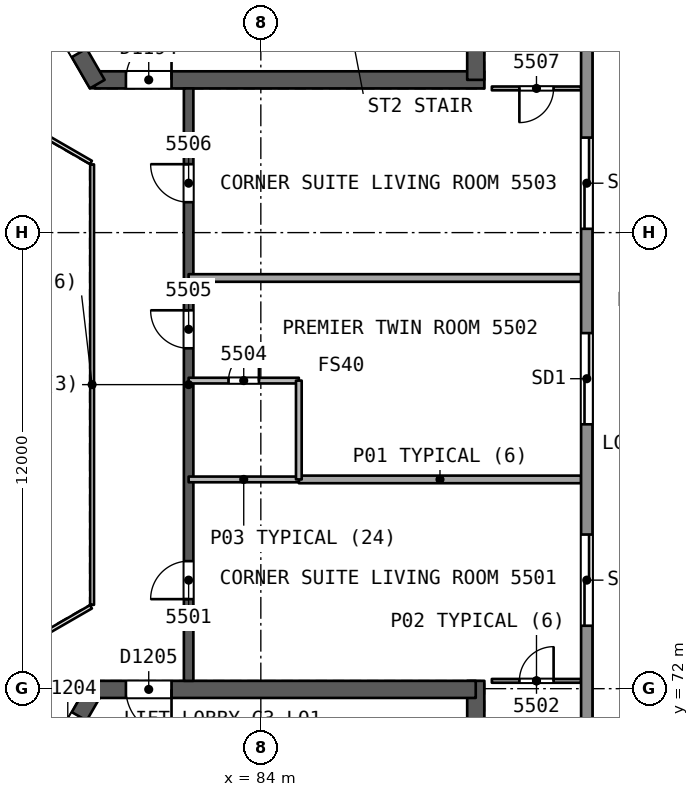
"""IFC4 building model, lengths in metres.
Left out: names, types, materials, properties, quantities, classifications, styles, units other than length and angle.
Written with IfcOpenShell. Run it as: python <this file> out.ifc"""

import sys

from ifc_helpers import new_model, si_unit, direction, frame, frame_2d, origin, place, context, subcontext, project, spatial, rectangle, extrude, element, fill, save


model = new_model("IFC4")
c1 = context("Model", 3, precision=1e-05, world=origin(), true_north=direction((0.0, 1.0)))
c2 = subcontext(c1, "Body", "Model", "MODEL_VIEW")
j1 = project(units=[si_unit("LENGTHUNIT", "METRE"), si_unit("PLANEANGLEUNIT", "RADIAN")], contexts=[c1])
p1 = place(None, origin())
s1 = spatial("IfcSite", under=j1, at=p1, CompositionType="ELEMENT")
p2 = place(p1, origin())
s2 = spatial("IfcBuilding", under=s1, at=p2, CompositionType="ELEMENT")
p3 = place(p2, frame((0.0, 0.0, 224.3)))
s3 = spatial("IfcBuildingStorey", under=s2, at=p3, CompositionType="ELEMENT", Elevation=224.3)
p4 = place(p3, frame((79.63, 88.019, 0.0), z_axis=(0.0, 0.0, 1.0), x_axis=(1.0, 0.0, 0.0)))
e1 = element("IfcWall", 1, at=p4, inside=s3, PredefinedType="SHEAR", context=c2, shape_type="SweptSolid", body=[
    extrude(rectangle(XDim=10.25, YDim=0.45, at=frame_2d((5.125, 0.0))), origin(), (0.0, 0.0, 1.0), 3.7),
])
p5 = place(p4, frame((0.82, 0.0, 0.0)))
e2 = element("IfcOpeningElement", 2, at=p5, cuts=e1, PredefinedType="OPENING", context=c2, shape_type="SweptSolid", body=[
    extrude(rectangle(XDim=1.2, YDim=2.1, at=frame_2d((0.6, 1.05))), frame((0.0, 0.235, 0.0), z_axis=(0.0, -1.0, 0.0), x_axis=(1.0, 0.0, 0.0)), (0.0, 0.0, 1.0), 0.471),
])
p6 = place(p3, frame((89.655, 88.019, 0.0), z_axis=(0.0, 0.0, 1.0), x_axis=(0.0, 1.0, 0.0)))
e3 = element("IfcWall", 3, at=p6, inside=s3, PredefinedType="SHEAR", context=c2, shape_type="SweptSolid", body=[
    extrude(rectangle(XDim=14.108, YDim=0.45, at=frame_2d((7.054, 0.0))), origin(), (0.0, 0.0, 1.0), 3.7),
])
p7 = place(p3, frame((74.617, 96.701, 0.0), z_axis=(0.0, 0.0, 1.0), x_axis=(0.499994385119, -0.866028645513, 0.0)))
e4 = element("IfcWall", 4, at=p7, inside=s3, PredefinedType="SHEAR", context=c2, shape_type="SweptSolid", body=[
    extrude(rectangle(XDim=10.155, YDim=0.45, at=frame_2d((5.077, 0.0))), origin(), (0.0, 0.0, 1.0), 3.7),
])
p8 = place(p7, frame((8.005, 0.0, 0.0)))
e5 = element("IfcOpeningElement", 5, at=p8, cuts=e4, PredefinedType="OPENING", context=c2, shape_type="SweptSolid", body=[
    extrude(rectangle(XDim=1.2, YDim=2.1, at=frame_2d((0.6, 1.05))), frame((0.0, 0.235, 0.0), z_axis=(0.0, -1.0, 0.0), x_axis=(1.0, 0.0, 0.0)), (0.0, 0.0, 1.0), 0.471),
])
p9 = place(p3, frame((79.63, 71.981, 0.0), z_axis=(0.0, 0.0, 1.0), x_axis=(-0.500002171595, -0.86602415001, 0.0)))
e6 = element("IfcWall", 6, at=p9, inside=s3, PredefinedType="SHEAR", context=c2, shape_type="SweptSolid", body=[
    extrude(rectangle(XDim=10.25, YDim=0.45, at=frame_2d((5.125, 0.0))), origin(), (0.0, 0.0, 1.0), 3.7),
])
p10 = place(p9, frame((0.82, 0.0, 0.0)))
e7 = element("IfcOpeningElement", 7, at=p10, cuts=e6, PredefinedType="OPENING", context=c2, shape_type="SweptSolid", body=[
    extrude(rectangle(XDim=1.2, YDim=2.1, at=frame_2d((0.6, 1.05))), frame((0.0, 0.235, 0.0), z_axis=(0.0, -1.0, 0.0), x_axis=(1.0, 0.0, 0.0)), (0.0, 0.0, 1.0), 0.471),
])
p11 = place(p3, frame((89.655, 58.002, 0.0), z_axis=(0.0, 0.0, 1.0), x_axis=(0.0, 1.0, 0.0)))
e8 = element("IfcWall", 8, at=p11, inside=s3, PredefinedType="SHEAR", context=c2, shape_type="SweptSolid", body=[
    extrude(rectangle(XDim=14.204, YDim=0.45, at=frame_2d((7.102, 0.0))), origin(), (0.0, 0.0, 1.0), 3.7),
])
p12 = place(p3, frame((89.655, 71.981, 0.0), z_axis=(0.0, 0.0, 1.0), x_axis=(-1.0, 0.0, 0.0)))
e9 = element("IfcWall", 9, at=p12, inside=s3, PredefinedType="SHEAR", context=c2, shape_type="SweptSolid", body=[
    extrude(rectangle(XDim=10.155, YDim=0.45, at=frame_2d((5.078, 0.0))), origin(), (0.0, 0.0, 1.0), 3.7),
])
p13 = place(p12, frame((8.005, 0.0, 0.0)))
e10 = element("IfcOpeningElement", 10, at=p13, cuts=e9, PredefinedType="OPENING", context=c2, shape_type="SweptSolid", body=[
    extrude(rectangle(XDim=1.2, YDim=2.1, at=frame_2d((0.6, 1.05))), frame((0.0, 0.235, 0.0), z_axis=(0.0, -1.0, 0.0), x_axis=(1.0, 0.0, 0.0)), (0.0, 0.0, 1.0), 0.471),
])
p14 = place(p3, frame((82.1, 72.206, 0.0), z_axis=(0.0, 0.0, 1.0), x_axis=(0.0, 1.0, 0.0)))
e11 = element("IfcWall", 11, at=p14, inside=s3, PredefinedType="SHEAR", context=c2, shape_type="SweptSolid", body=[
    extrude(rectangle(XDim=15.588, YDim=0.25, at=frame_2d((7.794, 0.0))), origin(), (0.0, 0.0, 1.0), 3.3),
])
p15 = place(p14, frame((2.15, 0.0, 0.0)))
e12 = element("IfcOpeningElement", 12, at=p15, cuts=e11, PredefinedType="OPENING", context=c2, shape_type="SweptSolid", body=[
    extrude(rectangle(XDim=1.0, YDim=2.1, at=frame_2d((0.5, 1.05))), frame((0.0, 0.135, 0.0), z_axis=(0.0, -1.0, 0.0), x_axis=(1.0, 0.0, 0.0)), (0.0, 0.0, 1.0), 0.271),
])
p16 = place(p14, frame((8.75, 0.0, 0.0)))
e13 = element("IfcOpeningElement", 13, at=p16, cuts=e11, PredefinedType="OPENING", context=c2, shape_type="SweptSolid", body=[
    extrude(rectangle(XDim=1.0, YDim=2.1, at=frame_2d((0.5, 1.05))), frame((0.0, 0.135, 0.0), z_axis=(0.0, -1.0, 0.0), x_axis=(1.0, 0.0, 0.0)), (0.0, 0.0, 1.0), 0.271),
])
p17 = place(p14, frame((12.594, 0.0, 0.0)))
e14 = element("IfcOpeningElement", 14, at=p17, cuts=e11, PredefinedType="OPENING", context=c2, shape_type="SweptSolid", body=[
    extrude(rectangle(XDim=1.0, YDim=2.1, at=frame_2d((0.5, 1.05))), frame((0.0, 0.135, 0.0), z_axis=(0.0, -1.0, 0.0), x_axis=(1.0, 0.0, 0.0)), (0.0, 0.0, 1.0), 0.271),
])
p18 = place(p3, frame((90.079, 72.206, 0.0), z_axis=(0.0, 0.0, 1.0), x_axis=(1.0, 0.0, 0.0)))
e15 = element("IfcWall", 15, at=p18, inside=s3, PredefinedType="PARTITIONING", context=c2, shape_type="SweptSolid", body=[
    extrude(rectangle(XDim=2.349, YDim=0.1, at=frame_2d((1.175, 0.0))), origin(), (0.0, 0.0, 1.0), 3.3),
])
p19 = place(p18, frame((0.725, 0.0, 0.0)))
e16 = element("IfcOpeningElement", 16, at=p19, cuts=e15, PredefinedType="OPENING", context=c2, shape_type="SweptSolid", body=[
    extrude(rectangle(XDim=0.9, YDim=2.1, at=frame_2d((0.45, 1.05))), frame((0.0, 0.061, 0.0), z_axis=(0.0, -1.0, 0.0), x_axis=(1.0, 0.0, 0.0)), (0.0, 0.0, 1.0), 0.121),
])
p20 = place(p3, frame((92.428, 77.506, 0.0), z_axis=(0.0, 0.0, 1.0), x_axis=(-1.0, 0.0, 0.0)))
e17 = element("IfcWall", 17, at=p20, inside=s3, PredefinedType="PARTITIONING", context=c2, shape_type="SweptSolid", body=[
    extrude(rectangle(XDim=7.428, YDim=0.2, at=frame_2d((3.714, 0.0))), origin(), (0.0, 0.0, 1.0), 3.3),
])
p21 = place(p3, frame((85.0, 77.506, 0.0), z_axis=(0.0, 0.0, 1.0), x_axis=(-1.0, 0.0, 0.0)))
e18 = element("IfcWall", 18, at=p21, inside=s3, PredefinedType="PARTITIONING", context=c2, shape_type="SweptSolid", body=[
    extrude(rectangle(XDim=2.9, YDim=0.15, at=frame_2d((1.45, 0.0))), origin(), (0.0, 0.0, 1.0), 3.3),
])
p22 = place(p3, frame((82.1, 80.106, 0.0), z_axis=(0.0, 0.0, 1.0), x_axis=(1.0, 0.0, 0.0)))
e19 = element("IfcWall", 19, at=p22, inside=s3, PredefinedType="PARTITIONING", context=c2, shape_type="SweptSolid", body=[
    extrude(rectangle(XDim=2.9, YDim=0.15, at=frame_2d((1.45, 0.0))), origin(), (0.0, 0.0, 1.0), 3.3),
])
p23 = place(p22, frame((1.05, 0.0, 0.0)))
e20 = element("IfcOpeningElement", 20, at=p23, cuts=e19, PredefinedType="OPENING", context=c2, shape_type="SweptSolid", body=[
    extrude(rectangle(XDim=0.8, YDim=2.1, at=frame_2d((0.4, 1.05))), frame((0.0, 0.085, 0.0), z_axis=(0.0, -1.0, 0.0), x_axis=(1.0, 0.0, 0.0)), (0.0, 0.0, 1.0), 0.171),
])
p24 = place(p3, frame((85.0, 80.106, 0.0), z_axis=(0.0, 0.0, 1.0), x_axis=(0.0, -1.0, 0.0)))
e21 = element("IfcWall", 21, at=p24, inside=s3, PredefinedType="PARTITIONING", context=c2, shape_type="SweptSolid", body=[
    extrude(rectangle(XDim=2.6, YDim=0.15, at=frame_2d((1.3, 0.0))), origin(), (0.0, 0.0, 1.0), 3.3),
])
p25 = place(p3, frame((92.428, 82.806, 0.0), z_axis=(0.0, 0.0, 1.0), x_axis=(-1.0, 0.0, 0.0)))
e22 = element("IfcWall", 22, at=p25, inside=s3, PredefinedType="PARTITIONING", context=c2, shape_type="SweptSolid", body=[
    extrude(rectangle(XDim=10.328, YDim=0.2, at=frame_2d((5.164, 0.0))), origin(), (0.0, 0.0, 1.0), 3.3),
])
p26 = place(p3, frame((92.428, 87.794, 0.0), z_axis=(0.0, 0.0, 1.0), x_axis=(-1.0, 0.0, 0.0)))
e23 = element("IfcWall", 23, at=p26, inside=s3, PredefinedType="PARTITIONING", context=c2, shape_type="SweptSolid", body=[
    extrude(rectangle(XDim=2.349, YDim=0.1, at=frame_2d((1.175, 0.0))), origin(), (0.0, 0.0, 1.0), 3.3),
])
p27 = place(p26, frame((0.725, 0.0, 0.0)))
e24 = element("IfcOpeningElement", 24, at=p27, cuts=e23, PredefinedType="OPENING", context=c2, shape_type="SweptSolid", body=[
    extrude(rectangle(XDim=0.9, YDim=2.1, at=frame_2d((0.45, 1.05))), frame((0.0, 0.061, 0.0), z_axis=(0.0, -1.0, 0.0), x_axis=(1.0, 0.0, 0.0)), (0.0, 0.0, 1.0), 0.121),
])
p28 = place(p3, frame((92.577, 105.274, 0.0), z_axis=(0.0, 0.0, 1.0), x_axis=(0.0, -1.0, 0.0)))
e25 = element("IfcWall", 25, at=p28, inside=s3, PredefinedType="SOLIDWALL", context=c2, shape_type="SweptSolid", body=[
    extrude(rectangle(XDim=50.547, YDim=0.3, at=frame_2d((25.274, 0.0))), origin(), (0.0, 0.0, 1.0), 3.3),
])
p29 = place(p28, frame((29.218, 0.0, 0.0)))
e26 = element("IfcOpeningElement", 26, at=p29, cuts=e25, PredefinedType="OPENING", context=c2, shape_type="SweptSolid", body=[
    extrude(rectangle(XDim=2.4, YDim=2.4, at=frame_2d((1.2, 1.2))), frame((0.0, 0.161, 0.0), z_axis=(0.0, -1.0, 0.0), x_axis=(1.0, 0.0, 0.0)), (0.0, 0.0, 1.0), 0.321),
])
p30 = place(p28, frame((39.328, 0.0, 0.0)))
e27 = element("IfcOpeningElement", 27, at=p30, cuts=e25, PredefinedType="OPENING", context=c2, shape_type="SweptSolid", body=[
    extrude(rectangle(XDim=2.4, YDim=2.4, at=frame_2d((1.2, 1.2))), frame((0.0, 0.161, 0.0), z_axis=(0.0, -1.0, 0.0), x_axis=(1.0, 0.0, 0.0)), (0.0, 0.0, 1.0), 0.321),
])
p31 = place(p28, frame((18.774, 0.0, 0.0)))
e28 = element("IfcOpeningElement", 28, at=p31, cuts=e25, PredefinedType="OPENING", context=c2, shape_type="SweptSolid", body=[
    extrude(rectangle(XDim=2.4, YDim=2.4, at=frame_2d((1.2, 1.2))), frame((0.0, 0.161, 0.0), z_axis=(0.0, -1.0, 0.0), x_axis=(1.0, 0.0, 0.0)), (0.0, 0.0, 1.0), 0.321),
])
p32 = place(p28, frame((8.771, 0.0, 0.0)))
e29 = element("IfcOpeningElement", 29, at=p32, cuts=e25, PredefinedType="OPENING", context=c2, shape_type="SweptSolid", body=[
    extrude(rectangle(XDim=2.4, YDim=2.4, at=frame_2d((1.2, 1.2))), frame((0.0, 0.161, 0.0), z_axis=(0.0, -1.0, 0.0), x_axis=(1.0, 0.0, 0.0)), (0.0, 0.0, 1.0), 0.321),
])
p33 = place(p28, frame((23.918, 0.0, 0.0)))
e30 = element("IfcOpeningElement", 30, at=p33, cuts=e25, PredefinedType="OPENING", context=c2, shape_type="SweptSolid", body=[
    extrude(rectangle(XDim=2.4, YDim=2.4, at=frame_2d((1.2, 1.2))), frame((0.0, 0.161, 0.0), z_axis=(0.0, -1.0, 0.0), x_axis=(1.0, 0.0, 0.0)), (0.0, 0.0, 1.0), 0.321),
])
p34 = place(p3, frame((44.324, 82.585, 0.0), z_axis=(0.0, 0.0, 1.0), x_axis=(0.86602584856, 0.499999229625, 0.0)))
e31 = element("IfcWall", 31, at=p34, inside=s3, PredefinedType="SOLIDWALL", context=c2, shape_type="SweptSolid", body=[
    extrude(rectangle(XDim=50.547, YDim=0.3, at=frame_2d((25.274, 0.0))), origin(), (0.0, 0.0, 1.0), 3.3),
])
p35 = place(p34, frame((24.23, 0.0, 0.0)))
e32 = element("IfcOpeningElement", 32, at=p35, cuts=e31, PredefinedType="OPENING", context=c2, shape_type="SweptSolid", body=[
    extrude(rectangle(XDim=2.4, YDim=2.4, at=frame_2d((1.2, 1.2))), frame((0.0, 0.161, 0.0), z_axis=(0.0, -1.0, 0.0), x_axis=(1.0, 0.0, 0.0)), (0.0, 0.0, 1.0), 0.321),
])
p36 = place(p34, frame((29.218, 0.0, 0.0)))
e33 = element("IfcOpeningElement", 33, at=p36, cuts=e31, PredefinedType="OPENING", context=c2, shape_type="SweptSolid", body=[
    extrude(rectangle(XDim=2.4, YDim=2.4, at=frame_2d((1.2, 1.2))), frame((0.0, 0.161, 0.0), z_axis=(0.0, -1.0, 0.0), x_axis=(1.0, 0.0, 0.0)), (0.0, 0.0, 1.0), 0.321),
])
p37 = place(p34, frame((39.328, 0.0, 0.0)))
e34 = element("IfcOpeningElement", 34, at=p37, cuts=e31, PredefinedType="OPENING", context=c2, shape_type="SweptSolid", body=[
    extrude(rectangle(XDim=2.4, YDim=2.4, at=frame_2d((1.2, 1.2))), frame((0.0, 0.161, 0.0), z_axis=(0.0, -1.0, 0.0), x_axis=(1.0, 0.0, 0.0)), (0.0, 0.0, 1.0), 0.321),
])
p38 = place(p34, frame((19.085, 0.0, 0.0)))
e35 = element("IfcOpeningElement", 35, at=p38, cuts=e31, PredefinedType="OPENING", context=c2, shape_type="SweptSolid", body=[
    extrude(rectangle(XDim=2.4, YDim=2.4, at=frame_2d((1.2, 1.2))), frame((0.0, 0.161, 0.0), z_axis=(0.0, -1.0, 0.0), x_axis=(1.0, 0.0, 0.0)), (0.0, 0.0, 1.0), 0.321),
])
p39 = place(p34, frame((8.771, 0.0, 0.0)))
e36 = element("IfcOpeningElement", 36, at=p39, cuts=e31, PredefinedType="OPENING", context=c2, shape_type="SweptSolid", body=[
    extrude(rectangle(XDim=2.4, YDim=2.4, at=frame_2d((1.2, 1.2))), frame((0.0, 0.161, 0.0), z_axis=(0.0, -1.0, 0.0), x_axis=(1.0, 0.0, 0.0)), (0.0, 0.0, 1.0), 0.321),
])
p40 = place(p3, frame((88.099, 52.141, 0.0), z_axis=(0.0, 0.0, 1.0), x_axis=(-0.86602584856, 0.499999229625, 0.0)))
e37 = element("IfcWall", 37, at=p40, inside=s3, PredefinedType="SOLIDWALL", context=c2, shape_type="SweptSolid", body=[
    extrude(rectangle(XDim=50.547, YDim=0.3, at=frame_2d((25.274, 0.0))), origin(), (0.0, 0.0, 1.0), 3.3),
])
p41 = place(p40, frame((23.294, 0.0, 0.0)))
e38 = element("IfcOpeningElement", 38, at=p41, cuts=e37, PredefinedType="OPENING", context=c2, shape_type="SweptSolid", body=[
    extrude(rectangle(XDim=2.4, YDim=2.4, at=frame_2d((1.2, 1.2))), frame((0.0, 0.161, 0.0), z_axis=(0.0, -1.0, 0.0), x_axis=(1.0, 0.0, 0.0)), (0.0, 0.0, 1.0), 0.321),
])
p42 = place(p40, frame((28.906, 0.0, 0.0)))
e39 = element("IfcOpeningElement", 39, at=p42, cuts=e37, PredefinedType="OPENING", context=c2, shape_type="SweptSolid", body=[
    extrude(rectangle(XDim=2.4, YDim=2.4, at=frame_2d((1.2, 1.2))), frame((0.0, 0.161, 0.0), z_axis=(0.0, -1.0, 0.0), x_axis=(1.0, 0.0, 0.0)), (0.0, 0.0, 1.0), 0.321),
])
p43 = place(p40, frame((39.328, 0.0, 0.0)))
e40 = element("IfcOpeningElement", 40, at=p43, cuts=e37, PredefinedType="OPENING", context=c2, shape_type="SweptSolid", body=[
    extrude(rectangle(XDim=2.4, YDim=2.4, at=frame_2d((1.2, 1.2))), frame((0.0, 0.161, 0.0), z_axis=(0.0, -1.0, 0.0), x_axis=(1.0, 0.0, 0.0)), (0.0, 0.0, 1.0), 0.321),
])
p44 = place(p40, frame((18.462, 0.0, 0.0)))
e41 = element("IfcOpeningElement", 41, at=p44, cuts=e37, PredefinedType="OPENING", context=c2, shape_type="SweptSolid", body=[
    extrude(rectangle(XDim=2.4, YDim=2.4, at=frame_2d((1.2, 1.2))), frame((0.0, 0.161, 0.0), z_axis=(0.0, -1.0, 0.0), x_axis=(1.0, 0.0, 0.0)), (0.0, 0.0, 1.0), 0.321),
])
p45 = place(p40, frame((8.771, 0.0, 0.0)))
e42 = element("IfcOpeningElement", 42, at=p45, cuts=e37, PredefinedType="OPENING", context=c2, shape_type="SweptSolid", body=[
    extrude(rectangle(XDim=2.4, YDim=2.4, at=frame_2d((1.2, 1.2))), frame((0.0, 0.161, 0.0), z_axis=(0.0, -1.0, 0.0), x_axis=(1.0, 0.0, 0.0)), (0.0, 0.0, 1.0), 0.321),
])
p46 = place(p3, frame((79.56, 74.206, 0.0), z_axis=(0.0, 0.0, 1.0), x_axis=(0.0, 1.0, 0.0)))
e43 = element("IfcWall", 43, at=p46, inside=s3, PredefinedType="PARTITIONING", context=c2, shape_type="SweptSolid", body=[
    extrude(rectangle(XDim=11.588, YDim=0.1, at=frame_2d((5.794, 0.0))), origin(), (0.0, 0.0, 1.0), 3.3),
])
for number, where, z_axis, x_axis in (
    (44, (79.53, 85.846, 0.0), (0.0, 0.0, 1.0), (-0.866, 0.5, 0.0)),
    (45, (77.798, 73.154, 0.0), (0.0, 0.0, 1.0), (0.866, 0.5, 0.0)),
):
    element("IfcWall", number, at=place(p3, frame(where, z_axis=z_axis, x_axis=x_axis)), inside=s3, PredefinedType="PARTITIONING", context=c2, shape_type="SweptSolid", body=[
        extrude(rectangle(XDim=2.0, YDim=0.1, at=frame_2d((1.0, 0.0))), origin(), (0.0, 0.0, 1.0), 3.3),
    ])
p47 = place(p15, origin())
e46 = element("IfcDoor", 46, at=p47, inside=s3, OperationType="SINGLE_SWING_LEFT", PredefinedType="NOTDEFINED", context=c2, shape_type="SweptSolid", body=[
    extrude(rectangle(XDim=1.0, YDim=2.1, at=frame_2d((0.5, 1.05))), frame((0.0, 0.025, 0.0), z_axis=(0.0, -1.0, 0.0), x_axis=(1.0, 0.0, 0.0)), (0.0, 0.0, 1.0), 0.05),
])
fill(e12, e46)
p48 = place(p19, origin())
e47 = element("IfcDoor", 47, at=p48, inside=s3, OperationType="SINGLE_SWING_RIGHT", PredefinedType="NOTDEFINED", context=c2, shape_type="SweptSolid", body=[
    extrude(rectangle(XDim=0.9, YDim=2.1, at=frame_2d((0.45, 1.05))), frame((0.0, 0.025, 0.0), z_axis=(0.0, -1.0, 0.0), x_axis=(1.0, 0.0, 0.0)), (0.0, 0.0, 1.0), 0.05),
])
fill(e16, e47)
p49 = place(p23, origin())
e48 = element("IfcDoor", 48, at=p49, inside=s3, OperationType="SINGLE_SWING_RIGHT", PredefinedType="NOTDEFINED", context=c2, shape_type="SweptSolid", body=[
    extrude(rectangle(XDim=0.8, YDim=2.1, at=frame_2d((0.4, 1.05))), frame((0.0, 0.025, 0.0), z_axis=(0.0, -1.0, 0.0), x_axis=(1.0, 0.0, 0.0)), (0.0, 0.0, 1.0), 0.05),
])
fill(e20, e48)
p50 = place(p16, origin())
e49 = element("IfcDoor", 49, at=p50, inside=s3, OperationType="SINGLE_SWING_RIGHT", PredefinedType="NOTDEFINED", context=c2, shape_type="SweptSolid", body=[
    extrude(rectangle(XDim=1.0, YDim=2.1, at=frame_2d((0.5, 1.05))), frame((0.0, 0.025, 0.0), z_axis=(0.0, -1.0, 0.0), x_axis=(1.0, 0.0, 0.0)), (0.0, 0.0, 1.0), 0.05),
])
fill(e13, e49)
p51 = place(p17, origin())
e50 = element("IfcDoor", 50, at=p51, inside=s3, OperationType="SINGLE_SWING_RIGHT", PredefinedType="NOTDEFINED", context=c2, shape_type="SweptSolid", body=[
    extrude(rectangle(XDim=1.0, YDim=2.1, at=frame_2d((0.5, 1.05))), frame((0.0, 0.025, 0.0), z_axis=(0.0, -1.0, 0.0), x_axis=(1.0, 0.0, 0.0)), (0.0, 0.0, 1.0), 0.05),
])
fill(e14, e50)
p52 = place(p27, origin())
e51 = element("IfcDoor", 51, at=p52, inside=s3, OperationType="SINGLE_SWING_RIGHT", PredefinedType="NOTDEFINED", context=c2, shape_type="SweptSolid", body=[
    extrude(rectangle(XDim=0.9, YDim=2.1, at=frame_2d((0.45, 1.05))), frame((0.0, 0.025, 0.0), z_axis=(0.0, -1.0, 0.0), x_axis=(1.0, 0.0, 0.0)), (0.0, 0.0, 1.0), 0.05),
])
fill(e24, e51)
p53 = place(p29, origin())
e52 = element("IfcDoor", 52, at=p53, inside=s3, OperationType="SLIDING_TO_LEFT", PredefinedType="NOTDEFINED", context=c2, shape_type="SweptSolid", body=[
    extrude(rectangle(XDim=2.4, YDim=2.4, at=frame_2d((1.2, 1.2))), frame((0.0, 0.025, 0.0), z_axis=(0.0, -1.0, 0.0), x_axis=(1.0, 0.0, 0.0)), (0.0, 0.0, 1.0), 0.05),
])
fill(e26, e52)
p54 = place(p31, origin())
e53 = element("IfcDoor", 53, at=p54, inside=s3, OperationType="SLIDING_TO_LEFT", PredefinedType="NOTDEFINED", context=c2, shape_type="SweptSolid", body=[
    extrude(rectangle(XDim=2.4, YDim=2.4, at=frame_2d((1.2, 1.2))), frame((0.0, 0.025, 0.0), z_axis=(0.0, -1.0, 0.0), x_axis=(1.0, 0.0, 0.0)), (0.0, 0.0, 1.0), 0.05),
])
fill(e28, e53)
p55 = place(p33, origin())
e54 = element("IfcDoor", 54, at=p55, inside=s3, OperationType="SLIDING_TO_LEFT", PredefinedType="NOTDEFINED", context=c2, shape_type="SweptSolid", body=[
    extrude(rectangle(XDim=2.4, YDim=2.4, at=frame_2d((1.2, 1.2))), frame((0.0, 0.025, 0.0), z_axis=(0.0, -1.0, 0.0), x_axis=(1.0, 0.0, 0.0)), (0.0, 0.0, 1.0), 0.05),
])
fill(e30, e54)
p56 = place(p5, origin())
e55 = element("IfcDoor", 55, at=p56, inside=s3, OperationType="SINGLE_SWING_RIGHT", PredefinedType="NOTDEFINED", context=c2, shape_type="SweptSolid", body=[
    extrude(rectangle(XDim=1.2, YDim=2.1, at=frame_2d((0.6, 1.05))), frame((0.0, 0.025, 0.0), z_axis=(0.0, -1.0, 0.0), x_axis=(1.0, 0.0, 0.0)), (0.0, 0.0, 1.0), 0.05),
])
fill(e2, e55)
p57 = place(p8, origin())
e56 = element("IfcDoor", 56, at=p57, inside=s3, OperationType="SINGLE_SWING_LEFT", PredefinedType="NOTDEFINED", context=c2, shape_type="SweptSolid", body=[
    extrude(rectangle(XDim=1.2, YDim=2.1, at=frame_2d((0.6, 1.05))), frame((0.0, 0.025, 0.0), z_axis=(0.0, -1.0, 0.0), x_axis=(1.0, 0.0, 0.0)), (0.0, 0.0, 1.0), 0.05),
])
fill(e5, e56)
p58 = place(p10, origin())
e57 = element("IfcDoor", 57, at=p58, inside=s3, OperationType="SINGLE_SWING_RIGHT", PredefinedType="NOTDEFINED", context=c2, shape_type="SweptSolid", body=[
    extrude(rectangle(XDim=1.2, YDim=2.1, at=frame_2d((0.6, 1.05))), frame((0.0, 0.025, 0.0), z_axis=(0.0, -1.0, 0.0), x_axis=(1.0, 0.0, 0.0)), (0.0, 0.0, 1.0), 0.05),
])
fill(e7, e57)
p59 = place(p13, origin())
e58 = element("IfcDoor", 58, at=p59, inside=s3, OperationType="SINGLE_SWING_LEFT", PredefinedType="NOTDEFINED", context=c2, shape_type="SweptSolid", body=[
    extrude(rectangle(XDim=1.2, YDim=2.1, at=frame_2d((0.6, 1.05))), frame((0.0, 0.025, 0.0), z_axis=(0.0, -1.0, 0.0), x_axis=(1.0, 0.0, 0.0)), (0.0, 0.0, 1.0), 0.05),
])
fill(e10, e58)
save(model, sys.argv[1])
